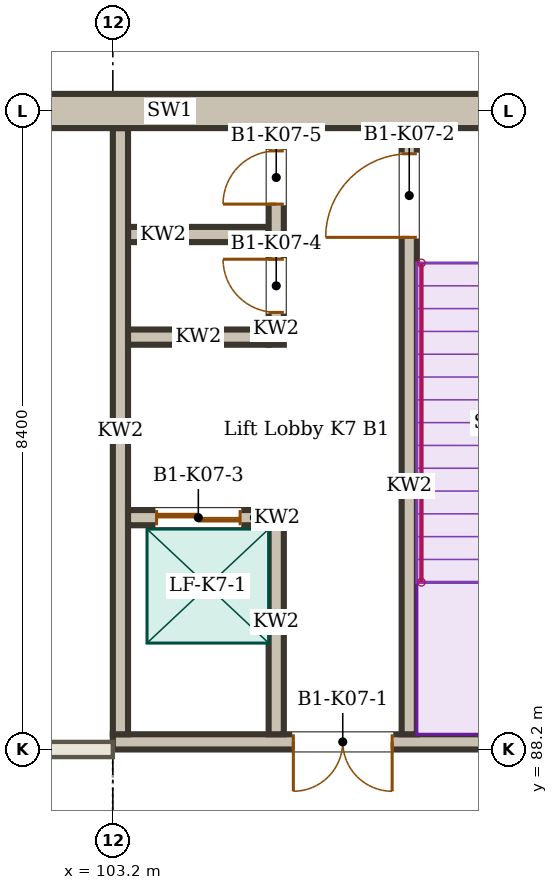
"""IFC4 building model, lengths in metres.
Left out: names, types, materials, properties, quantities, classifications, styles, units other than length and angle.
Written with IfcOpenShell. Run it as: python <this file> out.ifc"""

import sys

from ifc_helpers import new_model, si_unit, direction, frame, frame_2d, origin, place, context, subcontext, project, spatial, rectangle, extrude, element, fill, save


model = new_model("IFC4")
c1 = context("Model", 3, precision=1e-05, world=origin(), true_north=direction((0.0, 1.0)))
c2 = subcontext(c1, "Body", "Model", "MODEL_VIEW")
j1 = project(units=[si_unit("LENGTHUNIT", "METRE"), si_unit("PLANEANGLEUNIT", "RADIAN")], contexts=[c1])
p1 = place(None, origin())
s1 = spatial("IfcSite", under=j1, at=p1, CompositionType="ELEMENT")
p2 = place(p1, origin())
s2 = spatial("IfcBuilding", under=s1, at=p2, CompositionType="ELEMENT")
p3 = place(p2, frame((0.0, 0.0, -4.5)))
s3 = spatial("IfcBuildingStorey", under=s2, at=p3, CompositionType="ELEMENT", Elevation=-4.5)
p4 = place(p3, frame((111.6, 96.6, 0.0), z_axis=(0.0, 0.0, 1.0), x_axis=(-1.0, 0.0, 0.0)))
e1 = element("IfcWall", 1, at=p4, inside=s3, PredefinedType="SOLIDWALL", context=c2, shape_type="SweptSolid", body=[
    extrude(rectangle(XDim=51.0, YDim=0.45, at=frame_2d((25.5, 0.0))), origin(), (0.0, 0.0, 1.0), 4.35),
])
p5 = place(p3, frame((94.98, 88.2, 0.0), z_axis=(0.0, 0.0, 1.0), x_axis=(1.0, 0.0, 0.0)))
e2 = element("IfcWall", 2, at=p5, inside=s3, PredefinedType="PARTITIONING", context=c2, shape_type="SweptSolid", body=[
    extrude(rectangle(XDim=8.22, YDim=0.2, at=frame_2d((4.11, 0.0))), origin(), (0.0, 0.0, 1.0), 3.8),
])
p6 = place(p5, frame((3.52, 0.0, 0.0)))
e3 = element("IfcOpeningElement", 3, at=p6, cuts=e2, PredefinedType="OPENING", context=c2, shape_type="SweptSolid", body=[
    extrude(rectangle(XDim=1.0, YDim=2.1, at=frame_2d((0.5, 1.05))), frame((0.0, 0.11, 0.0), z_axis=(0.0, -1.0, 0.0), x_axis=(1.0, 0.0, 0.0)), (0.0, 0.0, 1.0), 0.22),
])
p7 = place(p3, frame((111.6, 88.3, 0.0), z_axis=(0.0, 0.0, 1.0), x_axis=(-1.0, 0.0, 0.0)))
e4 = element("IfcWall", 4, at=p7, inside=s3, PredefinedType="SOLIDWALL", context=c2, shape_type="SweptSolid", body=[
    extrude(rectangle(XDim=8.4, YDim=0.2, at=frame_2d((4.2, 0.0))), origin(), (0.0, 0.0, 1.0), 4.5),
])
p8 = place(p7, frame((4.725, 0.0, 0.0)))
e5 = element("IfcOpeningElement", 5, at=p8, cuts=e4, PredefinedType="OPENING", context=c2, shape_type="SweptSolid", body=[
    extrude(rectangle(XDim=1.3, YDim=2.1, at=frame_2d((0.65, 1.05))), frame((0.0, 0.11, 0.0), z_axis=(0.0, -1.0, 0.0), x_axis=(1.0, 0.0, 0.0)), (0.0, 0.0, 1.0), 0.22),
])
p9 = place(p3, frame((103.3, 88.4, 0.0), z_axis=(0.0, 0.0, 1.0), x_axis=(0.0, 1.0, 0.0)))
e6 = element("IfcWall", 6, at=p9, inside=s3, PredefinedType="SOLIDWALL", context=c2, shape_type="SweptSolid", body=[
    extrude(rectangle(XDim=7.975, YDim=0.2, at=frame_2d((3.988, 0.0))), origin(), (0.0, 0.0, 1.0), 4.5),
])
p10 = place(p3, frame((107.1, 88.4, 0.0), z_axis=(0.0, 0.0, 1.0), x_axis=(0.0, 1.0, 0.0)))
e7 = element("IfcWall", 7, at=p10, inside=s3, PredefinedType="SOLIDWALL", context=c2, shape_type="SweptSolid", body=[
    extrude(rectangle(XDim=7.975, YDim=0.2, at=frame_2d((3.988, 0.0))), origin(), (0.0, 0.0, 1.0), 4.5),
])
p11 = place(p10, frame((6.538, 0.0, 0.0)))
e8 = element("IfcOpeningElement", 8, at=p11, cuts=e7, PredefinedType="OPENING", context=c2, shape_type="SweptSolid", body=[
    extrude(rectangle(XDim=1.1, YDim=2.1, at=frame_2d((0.55, 1.05))), frame((0.0, 0.11, 0.0), z_axis=(0.0, -1.0, 0.0), x_axis=(1.0, 0.0, 0.0)), (0.0, 0.0, 1.0), 0.22),
])
p12 = place(p3, frame((105.35, 88.4, 0.0), z_axis=(0.0, 0.0, 1.0), x_axis=(0.0, 1.0, 0.0)))
e9 = element("IfcWall", 9, at=p12, inside=s3, PredefinedType="SOLIDWALL", context=c2, shape_type="SweptSolid", body=[
    extrude(rectangle(XDim=2.95, YDim=0.2, at=frame_2d((1.475, 0.0))), origin(), (0.0, 0.0, 1.0), 4.5),
])
p13 = place(p3, frame((105.35, 93.525, 0.0), z_axis=(0.0, 0.0, 1.0), x_axis=(0.0, 1.0, 0.0)))
e10 = element("IfcWall", 10, at=p13, inside=s3, PredefinedType="SOLIDWALL", context=c2, shape_type="SweptSolid", body=[
    extrude(rectangle(XDim=2.85, YDim=0.2, at=frame_2d((1.425, 0.0))), origin(), (0.0, 0.0, 1.0), 4.35),
])
p14 = place(p13, frame((0.425, 0.0, 0.0)))
e11 = element("IfcOpeningElement", 11, at=p14, cuts=e10, PredefinedType="OPENING", context=c2, shape_type="SweptSolid", body=[
    extrude(rectangle(XDim=0.7, YDim=2.1, at=frame_2d((0.35, 1.05))), frame((0.0, 0.11, 0.0), z_axis=(0.0, -1.0, 0.0), x_axis=(1.0, 0.0, 0.0)), (0.0, 0.0, 1.0), 0.22),
])
p15 = place(p13, frame((1.85, 0.0, 0.0)))
e12 = element("IfcOpeningElement", 12, at=p15, cuts=e10, PredefinedType="OPENING", context=c2, shape_type="SweptSolid", body=[
    extrude(rectangle(XDim=0.7, YDim=2.1, at=frame_2d((0.35, 1.05))), frame((0.0, 0.11, 0.0), z_axis=(0.0, -1.0, 0.0), x_axis=(1.0, 0.0, 0.0)), (0.0, 0.0, 1.0), 0.22),
])
p16 = place(p3, frame((105.25, 91.25, 0.0), z_axis=(0.0, 0.0, 1.0), x_axis=(-1.0, 0.0, 0.0)))
e13 = element("IfcWall", 13, at=p16, inside=s3, PredefinedType="SOLIDWALL", context=c2, shape_type="SweptSolid", body=[
    extrude(rectangle(XDim=1.85, YDim=0.2, at=frame_2d((0.925, 0.0))), origin(), (0.0, 0.0, 1.0), 4.5),
])
p17 = place(p16, frame((0.375, 0.0, 0.0)))
e14 = element("IfcOpeningElement", 14, at=p17, cuts=e13, PredefinedType="OPENING", context=c2, shape_type="SweptSolid", body=[
    extrude(rectangle(XDim=1.1, YDim=2.1, at=frame_2d((0.55, 1.05))), frame((0.0, 0.11, 0.0), z_axis=(0.0, -1.0, 0.0), x_axis=(1.0, 0.0, 0.0)), (0.0, 0.0, 1.0), 0.22),
])
for number, where, z_axis, x_axis in (
    (15, (105.25, 93.625, 0.0), (0.0, 0.0, 1.0), (-1.0, 0.0, 0.0)),
    (16, (105.25, 94.975, 0.0), (0.0, 0.0, 1.0), (-1.0, 0.0, 0.0)),
):
    element("IfcWall", number, at=place(p3, frame(where, z_axis=z_axis, x_axis=x_axis)), inside=s3, PredefinedType="SOLIDWALL", context=c2, shape_type="SweptSolid", body=[
        extrude(rectangle(XDim=1.85, YDim=0.2, at=frame_2d((0.925, 0.0))), origin(), (0.0, 0.0, 1.0), 4.35),
    ])
p18 = place(p8, origin())
e17 = element("IfcDoor", 17, at=p18, inside=s3, OperationType="DOUBLE_DOOR_DOUBLE_SWING", PredefinedType="DOOR", context=c2, shape_type="SweptSolid", body=[
    extrude(rectangle(XDim=1.3, YDim=2.1, at=frame_2d((0.65, 1.05))), frame((0.0, 0.025, 0.0), z_axis=(0.0, -1.0, 0.0), x_axis=(1.0, 0.0, 0.0)), (0.0, 0.0, 1.0), 0.05),
])
fill(e5, e17)
p19 = place(p11, origin())
e18 = element("IfcDoor", 18, at=p19, inside=s3, OperationType="SINGLE_SWING_LEFT", PredefinedType="DOOR", context=c2, shape_type="SweptSolid", body=[
    extrude(rectangle(XDim=1.1, YDim=2.1, at=frame_2d((0.55, 1.05))), frame((0.0, 0.025, 0.0), z_axis=(0.0, -1.0, 0.0), x_axis=(1.0, 0.0, 0.0)), (0.0, 0.0, 1.0), 0.05),
])
fill(e8, e18)
p20 = place(p17, origin())
e19 = element("IfcDoor", 19, at=p20, inside=s3, OperationType="DOUBLE_DOOR_SLIDING", PredefinedType="DOOR", context=c2, shape_type="SweptSolid", body=[
    extrude(rectangle(XDim=1.1, YDim=2.1, at=frame_2d((0.55, 1.05))), frame((0.0, 0.025, 0.0), z_axis=(0.0, -1.0, 0.0), x_axis=(1.0, 0.0, 0.0)), (0.0, 0.0, 1.0), 0.05),
])
fill(e14, e19)
p21 = place(p14, origin())
e20 = element("IfcDoor", 20, at=p21, inside=s3, OperationType="SINGLE_SWING_RIGHT", PredefinedType="DOOR", context=c2, shape_type="SweptSolid", body=[
    extrude(rectangle(XDim=0.7, YDim=2.1, at=frame_2d((0.35, 1.05))), frame((0.0, 0.025, 0.0), z_axis=(0.0, -1.0, 0.0), x_axis=(1.0, 0.0, 0.0)), (0.0, 0.0, 1.0), 0.05),
])
fill(e11, e20)
p22 = place(p15, origin())
e21 = element("IfcDoor", 21, at=p22, inside=s3, OperationType="SINGLE_SWING_LEFT", PredefinedType="DOOR", context=c2, shape_type="SweptSolid", body=[
    extrude(rectangle(XDim=0.7, YDim=2.1, at=frame_2d((0.35, 1.05))), frame((0.0, 0.025, 0.0), z_axis=(0.0, -1.0, 0.0), x_axis=(1.0, 0.0, 0.0)), (0.0, 0.0, 1.0), 0.05),
])
fill(e12, e21)
save(model, sys.argv[1])
